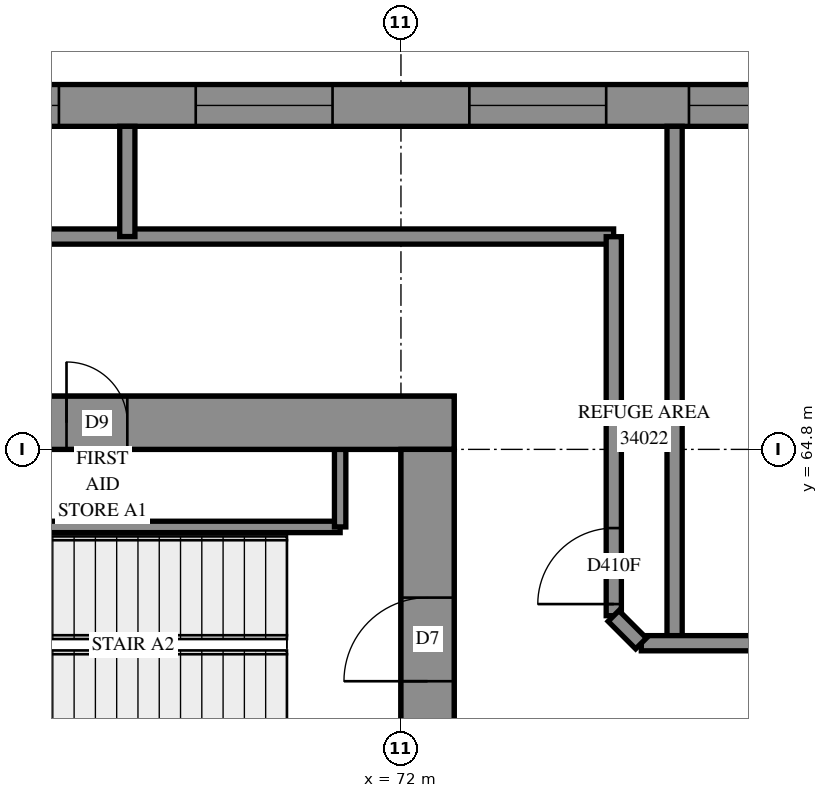
"""IFC4 building model, lengths in metres.
Left out: names, types, materials, properties, quantities, classifications, styles, units other than length and angle.
Written with IfcOpenShell. Run it as: python <this file> out.ifc"""

import sys

from ifc_helpers import new_model, si_unit, direction, frame, frame_2d, origin, place, context, subcontext, project, spatial, polyline, rectangle, outline, extrude, element, fill, save


model = new_model("IFC4")
c1 = context("Model", 3, precision=1e-05, world=origin(), true_north=direction((0.0, 1.0)))
c2 = subcontext(c1, "Body", "Model", "MODEL_VIEW")
j1 = project(units=[si_unit("LENGTHUNIT", "METRE"), si_unit("PLANEANGLEUNIT", "RADIAN")], contexts=[c1])
p1 = place(None, origin())
s1 = spatial("IfcSite", under=j1, at=p1, CompositionType="ELEMENT")
p2 = place(p1, origin())
s2 = spatial("IfcBuilding", under=s1, at=p2, CompositionType="ELEMENT")
p3 = place(p2, frame((0.0, 0.0, 126.2)))
s3 = spatial("IfcBuildingStorey", under=s2, at=p3, CompositionType="ELEMENT", Elevation=126.2)
p4 = place(p3, frame((56.9, 65.15, -0.3), z_axis=(0.0, 0.0, 1.0), x_axis=(1.0, 0.0, 0.0)))
e1 = element("IfcWall", 1, at=p4, inside=s3, PredefinedType="SHEAR", context=c2, shape_type="SweptSolid", body=[
    extrude(rectangle(XDim=15.8, YDim=0.7, at=frame_2d((7.9, 0.0))), origin(), (0.0, 0.0, 1.0), 4.3),
])
p5 = place(p4, frame((10.7, 0.0, 0.3)))
e2 = element("IfcOpeningElement", 2, at=p5, cuts=e1, PredefinedType="OPENING", context=c2, shape_type="SweptSolid", body=[
    extrude(rectangle(XDim=0.8, YDim=2.1, at=frame_2d((0.4, 1.05))), frame((0.0, 0.36, 0.0), z_axis=(0.0, -1.0, 0.0), x_axis=(1.0, 0.0, 0.0)), (0.0, 0.0, 1.0), 0.72),
])
p6 = place(p3, frame((72.35, 50.4, -0.3), z_axis=(0.0, 0.0, 1.0), x_axis=(0.0, 1.0, 0.0)))
e3 = element("IfcWall", 3, at=p6, inside=s3, PredefinedType="SHEAR", context=c2, shape_type="SweptSolid", body=[
    extrude(rectangle(XDim=14.4, YDim=0.7, at=frame_2d((7.2, 0.0))), origin(), (0.0, 0.0, 1.0), 4.3),
])
p7 = place(p6, frame((4.55, 0.0, 0.3)))
e4 = element("IfcOpeningElement", 4, at=p7, cuts=e3, PredefinedType="OPENING", context=c2, shape_type="SweptSolid", body=[
    extrude(rectangle(XDim=1.1, YDim=2.1, at=frame_2d((0.55, 1.05))), frame((0.0, 0.36, 0.0), z_axis=(0.0, -1.0, 0.0), x_axis=(1.0, 0.0, 0.0)), (0.0, 0.0, 1.0), 0.72),
])
p8 = place(p6, frame((11.35, 0.0, 0.3)))
e5 = element("IfcOpeningElement", 5, at=p8, cuts=e3, PredefinedType="OPENING", context=c2, shape_type="SweptSolid", body=[
    extrude(rectangle(XDim=1.1, YDim=2.1, at=frame_2d((0.55, 1.05))), frame((0.0, 0.36, 0.0), z_axis=(0.0, -1.0, 0.0), x_axis=(1.0, 0.0, 0.0)), (0.0, 0.0, 1.0), 0.72),
])
p9 = place(p3, frame((78.092, 69.325, 0.0), z_axis=(0.0, 0.0, 1.0), x_axis=(-1.0, 0.0, 0.0)))
e6 = element("IfcWall", 6, at=p9, inside=s3, PredefinedType="SOLIDWALL", context=c2, shape_type="SweptSolid", body=[
    extrude(outline(polyline([(-0.114, -0.275), (54.092, -0.275), (53.542, 0.275), (0.114, 0.275), (-0.114, -0.275)])), origin(), (0.0, 0.0, 1.0), 4.7),
])
p10 = place(p9, frame((0.503, 0.0, 0.9)))
e7 = element("IfcOpeningElement", 7, at=p10, cuts=e6, PredefinedType="OPENING", context=c2, shape_type="SweptSolid", body=[
    extrude(rectangle(XDim=1.8, YDim=2.4, at=frame_2d((0.9, 1.2))), frame((0.0, 0.285, 0.0), z_axis=(0.0, -1.0, 0.0), x_axis=(1.0, 0.0, 0.0)), (0.0, 0.0, 1.0), 0.57),
])
p11 = place(p9, frame((3.392, 0.0, 0.9)))
e8 = element("IfcOpeningElement", 8, at=p11, cuts=e6, PredefinedType="OPENING", context=c2, shape_type="SweptSolid", body=[
    extrude(rectangle(XDim=1.8, YDim=2.4, at=frame_2d((0.9, 1.2))), frame((0.0, 0.285, 0.0), z_axis=(0.0, -1.0, 0.0), x_axis=(1.0, 0.0, 0.0)), (0.0, 0.0, 1.0), 0.57),
])
p12 = place(p9, frame((6.992, 0.0, 0.9)))
e9 = element("IfcOpeningElement", 9, at=p12, cuts=e6, PredefinedType="OPENING", context=c2, shape_type="SweptSolid", body=[
    extrude(rectangle(XDim=1.8, YDim=2.4, at=frame_2d((0.9, 1.2))), frame((0.0, 0.285, 0.0), z_axis=(0.0, -1.0, 0.0), x_axis=(1.0, 0.0, 0.0)), (0.0, 0.0, 1.0), 0.57),
])
p13 = place(p9, frame((10.592, 0.0, 0.9)))
e10 = element("IfcOpeningElement", 10, at=p13, cuts=e6, PredefinedType="OPENING", context=c2, shape_type="SweptSolid", body=[
    extrude(rectangle(XDim=1.8, YDim=2.4, at=frame_2d((0.9, 1.2))), frame((0.0, 0.285, 0.0), z_axis=(0.0, -1.0, 0.0), x_axis=(1.0, 0.0, 0.0)), (0.0, 0.0, 1.0), 0.57),
])
p14 = place(p9, frame((14.192, 0.0, 0.9)))
e11 = element("IfcOpeningElement", 11, at=p14, cuts=e6, PredefinedType="OPENING", context=c2, shape_type="SweptSolid", body=[
    extrude(rectangle(XDim=1.8, YDim=2.4, at=frame_2d((0.9, 1.2))), frame((0.0, 0.285, 0.0), z_axis=(0.0, -1.0, 0.0), x_axis=(1.0, 0.0, 0.0)), (0.0, 0.0, 1.0), 0.57),
])
p15 = place(p9, frame((17.792, 0.0, 0.9)))
e12 = element("IfcOpeningElement", 12, at=p15, cuts=e6, PredefinedType="OPENING", context=c2, shape_type="SweptSolid", body=[
    extrude(rectangle(XDim=1.8, YDim=2.4, at=frame_2d((0.9, 1.2))), frame((0.0, 0.285, 0.0), z_axis=(0.0, -1.0, 0.0), x_axis=(1.0, 0.0, 0.0)), (0.0, 0.0, 1.0), 0.57),
])
p16 = place(p9, frame((21.392, 0.0, 0.9)))
e13 = element("IfcOpeningElement", 13, at=p16, cuts=e6, PredefinedType="OPENING", context=c2, shape_type="SweptSolid", body=[
    extrude(rectangle(XDim=1.8, YDim=2.4, at=frame_2d((0.9, 1.2))), frame((0.0, 0.285, 0.0), z_axis=(0.0, -1.0, 0.0), x_axis=(1.0, 0.0, 0.0)), (0.0, 0.0, 1.0), 0.57),
])
p17 = place(p9, frame((24.992, 0.0, 0.9)))
e14 = element("IfcOpeningElement", 14, at=p17, cuts=e6, PredefinedType="OPENING", context=c2, shape_type="SweptSolid", body=[
    extrude(rectangle(XDim=1.8, YDim=2.4, at=frame_2d((0.9, 1.2))), frame((0.0, 0.285, 0.0), z_axis=(0.0, -1.0, 0.0), x_axis=(1.0, 0.0, 0.0)), (0.0, 0.0, 1.0), 0.57),
])
p18 = place(p9, frame((28.592, 0.0, 0.9)))
e15 = element("IfcOpeningElement", 15, at=p18, cuts=e6, PredefinedType="OPENING", context=c2, shape_type="SweptSolid", body=[
    extrude(rectangle(XDim=1.8, YDim=2.4, at=frame_2d((0.9, 1.2))), frame((0.0, 0.285, 0.0), z_axis=(0.0, -1.0, 0.0), x_axis=(1.0, 0.0, 0.0)), (0.0, 0.0, 1.0), 0.57),
])
p19 = place(p9, frame((32.192, 0.0, 0.9)))
e16 = element("IfcOpeningElement", 16, at=p19, cuts=e6, PredefinedType="OPENING", context=c2, shape_type="SweptSolid", body=[
    extrude(rectangle(XDim=1.8, YDim=2.4, at=frame_2d((0.9, 1.2))), frame((0.0, 0.285, 0.0), z_axis=(0.0, -1.0, 0.0), x_axis=(1.0, 0.0, 0.0)), (0.0, 0.0, 1.0), 0.57),
])
p20 = place(p9, frame((35.792, 0.0, 0.9)))
e17 = element("IfcOpeningElement", 17, at=p20, cuts=e6, PredefinedType="OPENING", context=c2, shape_type="SweptSolid", body=[
    extrude(rectangle(XDim=1.8, YDim=2.4, at=frame_2d((0.9, 1.2))), frame((0.0, 0.285, 0.0), z_axis=(0.0, -1.0, 0.0), x_axis=(1.0, 0.0, 0.0)), (0.0, 0.0, 1.0), 0.57),
])
p21 = place(p9, frame((39.392, 0.0, 0.9)))
e18 = element("IfcOpeningElement", 18, at=p21, cuts=e6, PredefinedType="OPENING", context=c2, shape_type="SweptSolid", body=[
    extrude(rectangle(XDim=1.8, YDim=2.4, at=frame_2d((0.9, 1.2))), frame((0.0, 0.285, 0.0), z_axis=(0.0, -1.0, 0.0), x_axis=(1.0, 0.0, 0.0)), (0.0, 0.0, 1.0), 0.57),
])
p22 = place(p9, frame((42.992, 0.0, 0.9)))
e19 = element("IfcOpeningElement", 19, at=p22, cuts=e6, PredefinedType="OPENING", context=c2, shape_type="SweptSolid", body=[
    extrude(rectangle(XDim=1.8, YDim=2.4, at=frame_2d((0.9, 1.2))), frame((0.0, 0.285, 0.0), z_axis=(0.0, -1.0, 0.0), x_axis=(1.0, 0.0, 0.0)), (0.0, 0.0, 1.0), 0.57),
])
p23 = place(p9, frame((46.592, 0.0, 0.9)))
e20 = element("IfcOpeningElement", 20, at=p23, cuts=e6, PredefinedType="OPENING", context=c2, shape_type="SweptSolid", body=[
    extrude(rectangle(XDim=1.8, YDim=2.4, at=frame_2d((0.9, 1.2))), frame((0.0, 0.285, 0.0), z_axis=(0.0, -1.0, 0.0), x_axis=(1.0, 0.0, 0.0)), (0.0, 0.0, 1.0), 0.57),
])
p24 = place(p9, frame((50.192, 0.0, 0.9)))
e21 = element("IfcOpeningElement", 21, at=p24, cuts=e6, PredefinedType="OPENING", context=c2, shape_type="SweptSolid", body=[
    extrude(rectangle(XDim=1.8, YDim=2.4, at=frame_2d((0.9, 1.2))), frame((0.0, 0.285, 0.0), z_axis=(0.0, -1.0, 0.0), x_axis=(1.0, 0.0, 0.0)), (0.0, 0.0, 1.0), 0.57),
])
p25 = place(p3, frame((64.95, 63.78, 0.0), z_axis=(0.0, 0.0, 1.0), x_axis=(1.0, 0.0, 0.0)))
e22 = element("IfcWall", 22, at=p25, inside=s3, PredefinedType="PARTITIONING", context=c2, shape_type="SweptSolid", body=[
    extrude(rectangle(XDim=6.25, YDim=0.15, at=frame_2d((3.125, 0.0))), origin(), (0.0, 0.0, 1.0), 4.7),
])
p26 = place(p3, frame((71.2, 63.78, 0.0), z_axis=(0.0, 0.0, 1.0), x_axis=(0.0, 1.0, 0.0)))
e23 = element("IfcWall", 23, at=p26, inside=s3, PredefinedType="PARTITIONING", context=c2, shape_type="SweptSolid", body=[
    extrude(rectangle(XDim=1.02, YDim=0.15, at=frame_2d((0.51, 0.0))), origin(), (0.0, 0.0, 1.0), 4.7),
])
p27 = place(p3, frame((54.8, 67.6, 0.0), z_axis=(0.0, 0.0, 1.0), x_axis=(1.0, 0.0, 0.0)))
e24 = element("IfcWall", 24, at=p27, inside=s3, PredefinedType="PARTITIONING", context=c2, shape_type="SweptSolid", body=[
    extrude(rectangle(XDim=19.998, YDim=0.2, at=frame_2d((9.999, 0.0))), origin(), (0.0, 0.0, 1.0), 4.7),
])
p28 = place(p27, frame((8.738, 0.0, 0.0)))
e25 = element("IfcOpeningElement", 25, at=p28, cuts=e24, PredefinedType="OPENING", context=c2, shape_type="SweptSolid", body=[
    extrude(rectangle(XDim=1.0, YDim=2.1, at=frame_2d((0.5, 1.05))), frame((0.0, 0.11, 0.0), z_axis=(0.0, -1.0, 0.0), x_axis=(1.0, 0.0, 0.0)), (0.0, 0.0, 1.0), 0.22),
])
p29 = place(p3, frame((75.6, 62.25, 0.0), z_axis=(0.0, 0.0, 1.0), x_axis=(0.0, 1.0, 0.0)))
e26 = element("IfcWall", 26, at=p29, inside=s3, PredefinedType="PARTITIONING", context=c2, shape_type="SweptSolid", body=[
    extrude(rectangle(XDim=6.8, YDim=0.2, at=frame_2d((3.4, 0.0))), origin(), (0.0, 0.0, 1.0), 4.7),
])
p30 = place(p3, frame((74.8, 62.612, 0.0), z_axis=(0.0, 0.0, 1.0), x_axis=(0.0, 1.0, 0.0)))
e27 = element("IfcWall", 27, at=p30, inside=s3, PredefinedType="PARTITIONING", context=c2, shape_type="SweptSolid", body=[
    extrude(rectangle(XDim=4.986, YDim=0.2, at=frame_2d((2.493, 0.0))), origin(), (0.0, 0.0, 1.0), 4.7),
])
p31 = place(p30, frame((0.153, 0.0, 0.0)))
e28 = element("IfcOpeningElement", 28, at=p31, cuts=e27, PredefinedType="OPENING", context=c2, shape_type="SweptSolid", body=[
    extrude(rectangle(XDim=1.0, YDim=2.1, at=frame_2d((0.5, 1.05))), frame((0.0, 0.11, 0.0), z_axis=(0.0, -1.0, 0.0), x_axis=(1.0, 0.0, 0.0)), (0.0, 0.0, 1.0), 0.22),
])
p32 = place(p3, frame((75.162, 62.25, 0.0), z_axis=(0.0, 0.0, 1.0), x_axis=(1.0, 0.0, 0.0)))
e29 = element("IfcWall", 29, at=p32, inside=s3, PredefinedType="PARTITIONING", context=c2, shape_type="SweptSolid", body=[
    extrude(rectangle(XDim=4.038, YDim=0.2, at=frame_2d((2.019, 0.0))), origin(), (0.0, 0.0, 1.0), 4.7),
])
p33 = place(p3, frame((68.4, 67.6, 0.0), z_axis=(0.0, 0.0, 1.0), x_axis=(0.0, 1.0, 0.0)))
e30 = element("IfcWall", 30, at=p33, inside=s3, PredefinedType="PARTITIONING", context=c2, shape_type="SweptSolid", body=[
    extrude(rectangle(XDim=1.45, YDim=0.2, at=frame_2d((0.725, 0.0))), origin(), (0.0, 0.0, 1.0), 4.7),
])
p34 = place(p3, frame((74.796, 62.608, 0.0), z_axis=(0.0, 0.0, 1.0), x_axis=(0.7071067812, -0.7071067812, 0.0)))
e31 = element("IfcWall", 31, at=p34, inside=s3, PredefinedType="PARTITIONING", context=c2, shape_type="SweptSolid", body=[
    extrude(rectangle(XDim=0.512, YDim=0.2, at=frame_2d((0.256, 0.0))), origin(), (0.0, 0.0, 1.0), 4.7),
])
p35 = place(p10, origin())
e32 = element("IfcWindow", 32, at=p35, inside=s3, PartitioningType="SINGLE_PANEL", PredefinedType="WINDOW", context=c2, shape_type="SweptSolid", body=[
    extrude(rectangle(XDim=1.8, YDim=2.4, at=frame_2d((0.9, 1.2))), frame((0.0, 0.155, 0.0), z_axis=(0.0, -1.0, 0.0), x_axis=(1.0, 0.0, 0.0)), (0.0, 0.0, 1.0), 0.06),
])
fill(e7, e32)
p36 = place(p11, origin())
e33 = element("IfcWindow", 33, at=p36, inside=s3, PartitioningType="SINGLE_PANEL", PredefinedType="WINDOW", context=c2, shape_type="SweptSolid", body=[
    extrude(rectangle(XDim=1.8, YDim=2.4, at=frame_2d((0.9, 1.2))), frame((0.0, 0.155, 0.0), z_axis=(0.0, -1.0, 0.0), x_axis=(1.0, 0.0, 0.0)), (0.0, 0.0, 1.0), 0.06),
])
fill(e8, e33)
p37 = place(p12, origin())
e34 = element("IfcWindow", 34, at=p37, inside=s3, PartitioningType="SINGLE_PANEL", PredefinedType="WINDOW", context=c2, shape_type="SweptSolid", body=[
    extrude(rectangle(XDim=1.8, YDim=2.4, at=frame_2d((0.9, 1.2))), frame((0.0, 0.155, 0.0), z_axis=(0.0, -1.0, 0.0), x_axis=(1.0, 0.0, 0.0)), (0.0, 0.0, 1.0), 0.06),
])
fill(e9, e34)
p38 = place(p13, origin())
e35 = element("IfcWindow", 35, at=p38, inside=s3, PartitioningType="SINGLE_PANEL", PredefinedType="WINDOW", context=c2, shape_type="SweptSolid", body=[
    extrude(rectangle(XDim=1.8, YDim=2.4, at=frame_2d((0.9, 1.2))), frame((0.0, 0.155, 0.0), z_axis=(0.0, -1.0, 0.0), x_axis=(1.0, 0.0, 0.0)), (0.0, 0.0, 1.0), 0.06),
])
fill(e10, e35)
p39 = place(p5, origin())
e36 = element("IfcDoor", 36, at=p39, inside=s3, OperationType="SINGLE_SWING_RIGHT", PredefinedType="DOOR", context=c2, shape_type="SweptSolid", body=[
    extrude(rectangle(XDim=0.8, YDim=2.1, at=frame_2d((0.4, 1.05))), frame((0.0, -0.29, 0.0), z_axis=(0.0, -1.0, 0.0), x_axis=(1.0, 0.0, 0.0)), (0.0, 0.0, 1.0), 0.05),
])
fill(e2, e36)
p40 = place(p8, origin())
e37 = element("IfcDoor", 37, at=p40, inside=s3, OperationType="SINGLE_SWING_RIGHT", PredefinedType="DOOR", context=c2, shape_type="SweptSolid", body=[
    extrude(rectangle(XDim=1.1, YDim=2.1, at=frame_2d((0.55, 1.05))), frame((0.0, 0.025, 0.0), z_axis=(0.0, -1.0, 0.0), x_axis=(1.0, 0.0, 0.0)), (0.0, 0.0, 1.0), 0.05),
])
fill(e5, e37)
p41 = place(p31, origin())
e38 = element("IfcDoor", 38, at=p41, inside=s3, OperationType="SINGLE_SWING_LEFT", PredefinedType="DOOR", context=c2, shape_type="SweptSolid", body=[
    extrude(rectangle(XDim=1.0, YDim=2.1, at=frame_2d((0.5, 1.05))), frame((0.0, 0.025, 0.0), z_axis=(0.0, -1.0, 0.0), x_axis=(1.0, 0.0, 0.0)), (0.0, 0.0, 1.0), 0.05),
])
fill(e28, e38)
save(model, sys.argv[1])
